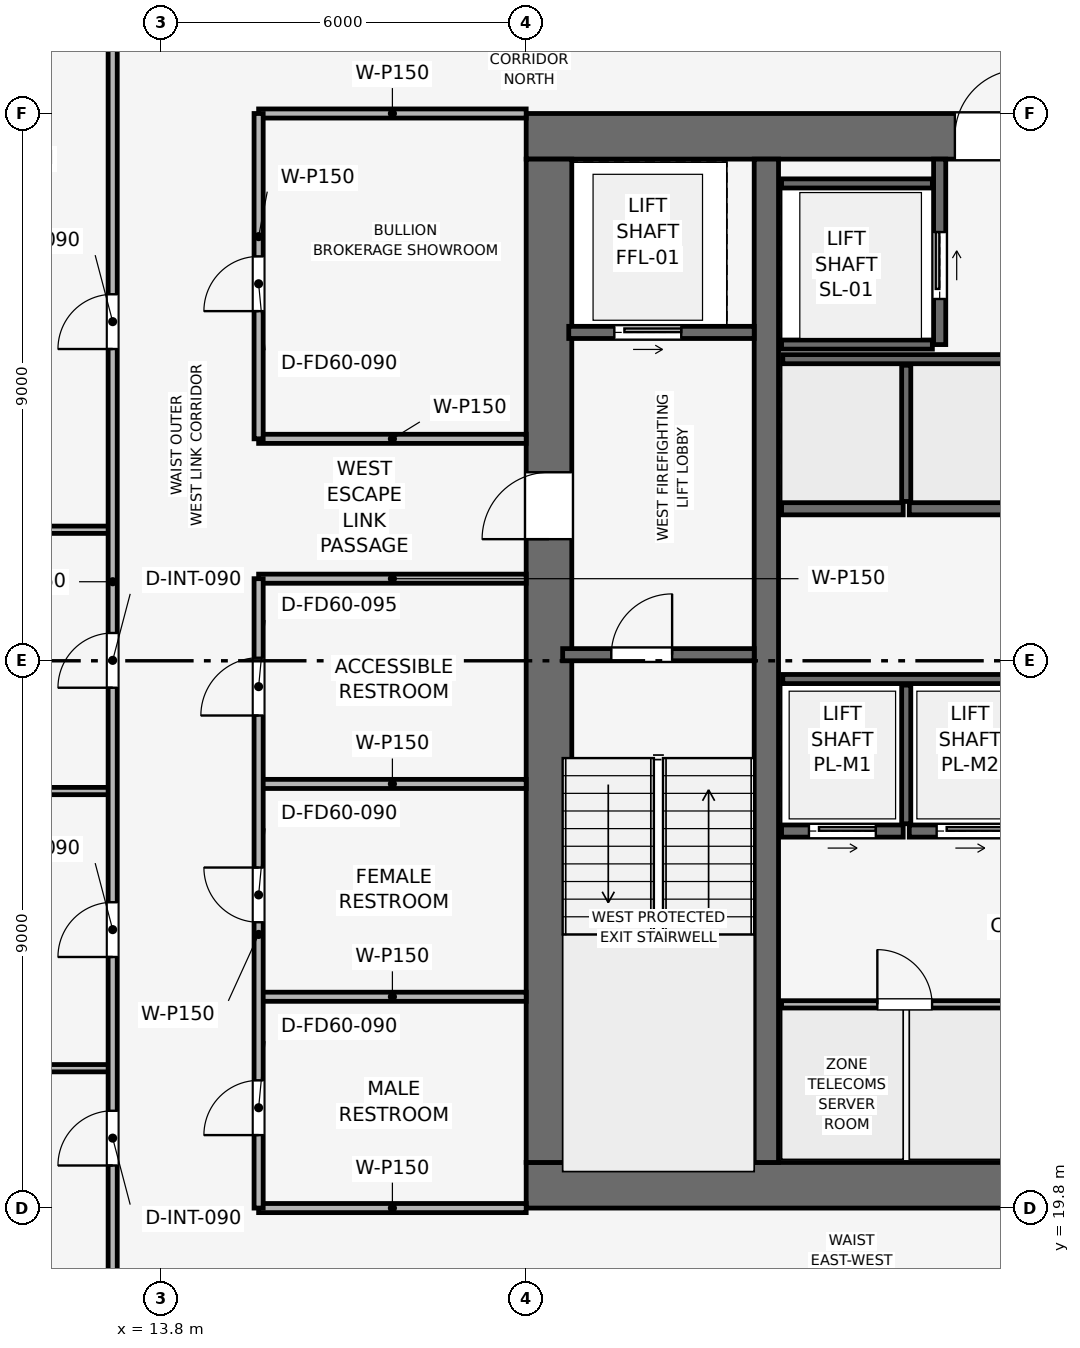
"""IFC4 building model, lengths in metres.
Left out: names, types, materials, properties, quantities, classifications, styles, units other than length and angle.
Written with IfcOpenShell. Run it as: python <this file> out.ifc"""

import sys

from ifc_helpers import new_model, si_unit, direction, frame, frame_2d, origin, place, context, subcontext, project, spatial, rectangle, extrude, element, fill, save


model = new_model("IFC4")
c1 = context("Model", 3, precision=1e-05, world=origin(), true_north=direction((0.0, 1.0)))
c2 = subcontext(c1, "Body", "Model", "MODEL_VIEW")
j1 = project(units=[si_unit("LENGTHUNIT", "METRE"), si_unit("PLANEANGLEUNIT", "RADIAN")], contexts=[c1])
p1 = place(None, origin())
s1 = spatial("IfcSite", under=j1, at=p1, CompositionType="ELEMENT")
p2 = place(p1, origin())
s2 = spatial("IfcBuilding", under=s1, at=p2, CompositionType="ELEMENT")
p3 = place(p2, frame((0.0, 0.0, 214.95)))
s3 = spatial("IfcBuildingStorey", under=s2, at=p3, CompositionType="ELEMENT", Elevation=214.95)
p4 = place(p3, frame((19.8, 20.175, 0.0), z_axis=(0.0, 0.0, 1.0), x_axis=(1.0, 0.0, 0.0)))
e1 = element("IfcWall", 1, at=p4, inside=s3, PredefinedType="SHEAR", context=c2, shape_type="SweptSolid", body=[
    extrude(rectangle(XDim=18.0, YDim=0.75, at=frame_2d((9.0, 0.0))), origin(), (0.0, 0.0, 1.0), 3.75),
])
p5 = place(p4, frame((8.4, 0.0, 0.0)))
e2 = element("IfcOpeningElement", 2, at=p5, cuts=e1, PredefinedType="OPENING", context=c2, shape_type="SweptSolid", body=[
    extrude(rectangle(XDim=1.2, YDim=2.2, at=frame_2d((0.6, 1.1))), frame((0.0, 0.385, 0.0), z_axis=(0.0, -1.0, 0.0), x_axis=(1.0, 0.0, 0.0)), (0.0, 0.0, 1.0), 0.77),
])
p6 = place(p3, frame((19.8, 37.425, 0.0), z_axis=(0.0, 0.0, 1.0), x_axis=(1.0, 0.0, 0.0)))
e3 = element("IfcWall", 3, at=p6, inside=s3, PredefinedType="SHEAR", context=c2, shape_type="SweptSolid", body=[
    extrude(rectangle(XDim=18.0, YDim=0.75, at=frame_2d((9.0, 0.0))), origin(), (0.0, 0.0, 1.0), 3.75),
])
p7 = place(p6, frame((7.05, 0.0, 0.0)))
e4 = element("IfcOpeningElement", 4, at=p7, cuts=e3, PredefinedType="OPENING", context=c2, shape_type="SweptSolid", body=[
    extrude(rectangle(XDim=1.1, YDim=2.15, at=frame_2d((0.55, 1.075))), frame((0.0, 0.385, 0.0), z_axis=(0.0, -1.0, 0.0), x_axis=(1.0, 0.0, 0.0)), (0.0, 0.0, 1.0), 0.77),
])
p8 = place(p3, frame((20.175, 20.55, 0.0), z_axis=(0.0, 0.0, 1.0), x_axis=(0.0, 1.0, 0.0)))
e5 = element("IfcWall", 5, at=p8, inside=s3, PredefinedType="SHEAR", context=c2, shape_type="SweptSolid", body=[
    extrude(rectangle(XDim=16.5, YDim=0.75, at=frame_2d((8.25, 0.0))), origin(), (0.0, 0.0, 1.0), 3.75),
])
p9 = place(p8, frame((10.25, 0.0, 0.0)))
e6 = element("IfcOpeningElement", 6, at=p9, cuts=e5, PredefinedType="OPENING", context=c2, shape_type="SweptSolid", body=[
    extrude(rectangle(XDim=1.1, YDim=2.15, at=frame_2d((0.55, 1.075))), frame((0.0, 0.385, 0.0), z_axis=(0.0, -1.0, 0.0), x_axis=(1.0, 0.0, 0.0)), (0.0, 0.0, 1.0), 0.77),
])
p10 = place(p3, frame((23.75, 20.55, 0.0), z_axis=(0.0, 0.0, 1.0), x_axis=(0.0, 1.0, 0.0)))
e7 = element("IfcWall", 7, at=p10, inside=s3, PredefinedType="SHEAR", context=c2, shape_type="SweptSolid", body=[
    extrude(rectangle(XDim=16.5, YDim=0.4, at=frame_2d((8.25, 0.0))), origin(), (0.0, 0.0, 1.0), 3.75),
])
p11 = place(p3, frame((20.4, 28.9, 0.0), z_axis=(0.0, 0.0, 1.0), x_axis=(1.0, 0.0, 0.0)))
e8 = element("IfcWall", 8, at=p11, inside=s3, PredefinedType="SHEAR", context=c2, shape_type="SweptSolid", body=[
    extrude(rectangle(XDim=3.15, YDim=0.2, at=frame_2d((1.575, 0.0))), origin(), (0.0, 0.0, 1.0), 3.5),
])
p12 = place(p11, frame((0.8, 0.0, 0.0)))
e9 = element("IfcOpeningElement", 9, at=p12, cuts=e8, PredefinedType="OPENING", context=c2, shape_type="SweptSolid", body=[
    extrude(rectangle(XDim=1.0, YDim=2.1, at=frame_2d((0.5, 1.05))), frame((0.0, 0.11, 0.0), z_axis=(0.0, -1.0, 0.0), x_axis=(1.0, 0.0, 0.0)), (0.0, 0.0, 1.0), 0.22),
])
p13 = place(p3, frame((20.5, 34.2, 0.0), z_axis=(0.0, 0.0, 1.0), x_axis=(1.0, 0.0, 0.0)))
e10 = element("IfcWall", 10, at=p13, inside=s3, PredefinedType="SHEAR", context=c2, shape_type="SweptSolid", body=[
    extrude(rectangle(XDim=3.05, YDim=0.2, at=frame_2d((1.525, 0.0))), origin(), (0.0, 0.0, 1.0), 3.5),
])
p14 = place(p13, frame((0.75, 0.0, 0.0)))
e11 = element("IfcOpeningElement", 11, at=p14, cuts=e10, PredefinedType="OPENING", context=c2, shape_type="SweptSolid", body=[
    extrude(rectangle(XDim=1.1, YDim=2.15, at=frame_2d((0.55, 1.075))), frame((0.0, 0.11, 0.0), z_axis=(0.0, -1.0, 0.0), x_axis=(1.0, 0.0, 0.0)), (0.0, 0.0, 1.0), 0.22),
])
p15 = place(p3, frame((26.6, 34.0, 0.0), z_axis=(0.0, 0.0, 1.0), x_axis=(0.0, 1.0, 0.0)))
e12 = element("IfcWall", 12, at=p15, inside=s3, PredefinedType="SHEAR", context=c2, shape_type="SweptSolid", body=[
    extrude(rectangle(XDim=3.05, YDim=0.2, at=frame_2d((1.525, 0.0))), origin(), (0.0, 0.0, 1.0), 3.5),
])
p16 = place(p15, frame((0.75, 0.0, 0.0)))
e13 = element("IfcOpeningElement", 13, at=p16, cuts=e12, PredefinedType="OPENING", context=c2, shape_type="SweptSolid", body=[
    extrude(rectangle(XDim=1.1, YDim=2.15, at=frame_2d((0.55, 1.075))), frame((0.0, 0.11, 0.0), z_axis=(0.0, -1.0, 0.0), x_axis=(1.0, 0.0, 0.0)), (0.0, 0.0, 1.0), 0.22),
])
for number, where, z_axis, x_axis in (
    (14, (24.0, 34.0, 0.0), (0.0, 0.0, 1.0), (1.0, 0.0, 0.0)),
    (15, (24.0, 36.65, 0.0), (0.0, 0.0, 1.0), (1.0, 0.0, 0.0)),
):
    element("IfcWall", number, at=place(p3, frame(where, z_axis=z_axis, x_axis=x_axis)), inside=s3, PredefinedType="SHEAR", context=c2, shape_type="SweptSolid", body=[
        extrude(rectangle(XDim=2.48, YDim=0.15, at=frame_2d((1.24, 0.0))), origin(), (0.0, 0.0, 1.0), 3.5),
    ])
p17 = place(p3, frame((24.0, 26.0, 0.0), z_axis=(0.0, 0.0, 1.0), x_axis=(1.0, 0.0, 0.0)))
e16 = element("IfcWall", 16, at=p17, inside=s3, PredefinedType="SHEAR", context=c2, shape_type="SweptSolid", body=[
    extrude(rectangle(XDim=2.0, YDim=0.2, at=frame_2d((1.0, 0.0))), origin(), (0.0, 0.0, 1.0), 3.5),
])
p18 = place(p17, frame((0.45, 0.0, 0.0)))
e17 = element("IfcOpeningElement", 17, at=p18, cuts=e16, PredefinedType="OPENING", context=c2, shape_type="SweptSolid", body=[
    extrude(rectangle(XDim=1.1, YDim=2.15, at=frame_2d((0.55, 1.075))), frame((0.0, 0.11, 0.0), z_axis=(0.0, -1.0, 0.0), x_axis=(1.0, 0.0, 0.0)), (0.0, 0.0, 1.0), 0.22),
])
p19 = place(p3, frame((26.1, 26.0, 0.0), z_axis=(0.0, 0.0, 1.0), x_axis=(1.0, 0.0, 0.0)))
e18 = element("IfcWall", 18, at=p19, inside=s3, PredefinedType="SHEAR", context=c2, shape_type="SweptSolid", body=[
    extrude(rectangle(XDim=2.0, YDim=0.2, at=frame_2d((1.0, 0.0))), origin(), (0.0, 0.0, 1.0), 3.5),
])
p20 = place(p19, frame((0.45, 0.0, 0.0)))
e19 = element("IfcOpeningElement", 19, at=p20, cuts=e18, PredefinedType="OPENING", context=c2, shape_type="SweptSolid", body=[
    extrude(rectangle(XDim=1.1, YDim=2.15, at=frame_2d((0.55, 1.075))), frame((0.0, 0.11, 0.0), z_axis=(0.0, -1.0, 0.0), x_axis=(1.0, 0.0, 0.0)), (0.0, 0.0, 1.0), 0.22),
])
for number, where, z_axis, x_axis in (
    (20, (24.0, 31.3, 0.0), (0.0, 0.0, 1.0), (1.0, 0.0, 0.0)),
    (21, (26.1, 31.3, 0.0), (0.0, 0.0, 1.0), (1.0, 0.0, 0.0)),
):
    element("IfcWall", number, at=place(p3, frame(where, z_axis=z_axis, x_axis=x_axis)), inside=s3, PredefinedType="SHEAR", context=c2, shape_type="SweptSolid", body=[
        extrude(rectangle(XDim=2.0, YDim=0.2, at=frame_2d((1.0, 0.0))), origin(), (0.0, 0.0, 1.0), 3.5),
    ])
p21 = place(p3, frame((24.02, 28.5, 0.0), z_axis=(0.0, 0.0, 1.0), x_axis=(1.0, 0.0, 0.0)))
e22 = element("IfcWall", 22, at=p21, inside=s3, PredefinedType="SHEAR", context=c2, shape_type="SweptSolid", body=[
    extrude(rectangle(XDim=4.08, YDim=0.15, at=frame_2d((2.04, 0.0))), origin(), (0.0, 0.0, 1.0), 3.5),
])
p22 = place(p3, frame((26.05, 26.12, 0.0), z_axis=(0.0, 0.0, 1.0), x_axis=(0.0, 1.0, 0.0)))
e23 = element("IfcWall", 23, at=p22, inside=s3, PredefinedType="SHEAR", context=c2, shape_type="SweptSolid", body=[
    extrude(rectangle(XDim=2.28, YDim=0.15, at=frame_2d((1.14, 0.0))), origin(), (0.0, 0.0, 1.0), 3.5),
])
p23 = place(p3, frame((24.02, 33.76, 0.0), z_axis=(0.0, 0.0, 1.0), x_axis=(1.0, 0.0, 0.0)))
e24 = element("IfcWall", 24, at=p23, inside=s3, PredefinedType="SHEAR", context=c2, shape_type="SweptSolid", body=[
    extrude(rectangle(XDim=4.08, YDim=0.15, at=frame_2d((2.04, 0.0))), origin(), (0.0, 0.0, 1.0), 3.5),
])
p24 = place(p3, frame((26.05, 31.42, 0.0), z_axis=(0.0, 0.0, 1.0), x_axis=(0.0, 1.0, 0.0)))
e25 = element("IfcWall", 25, at=p24, inside=s3, PredefinedType="SHEAR", context=c2, shape_type="SweptSolid", body=[
    extrude(rectangle(XDim=2.24, YDim=0.15, at=frame_2d((1.12, 0.0))), origin(), (0.0, 0.0, 1.0), 3.5),
])
p25 = place(p3, frame((24.0, 23.15, 0.0), z_axis=(0.0, 0.0, 1.0), x_axis=(1.0, 0.0, 0.0)))
e26 = element("IfcWall", 26, at=p25, inside=s3, PredefinedType="PARTITIONING", context=c2, shape_type="SweptSolid", body=[
    extrude(rectangle(XDim=4.05, YDim=0.12, at=frame_2d((2.025, 0.0))), origin(), (0.0, 0.0, 1.0), 3.5),
])
p26 = place(p25, frame((1.575, 0.0, 0.0)))
e27 = element("IfcOpeningElement", 27, at=p26, cuts=e26, PredefinedType="OPENING", context=c2, shape_type="SweptSolid", body=[
    extrude(rectangle(XDim=0.9, YDim=2.1, at=frame_2d((0.45, 1.05))), frame((0.0, 0.07, 0.0), z_axis=(0.0, -1.0, 0.0), x_axis=(1.0, 0.0, 0.0)), (0.0, 0.0, 1.0), 0.14),
])
p27 = place(p3, frame((15.4, 19.8, 0.0), z_axis=(0.0, 0.0, 1.0), x_axis=(1.0, 0.0, 0.0)))
e28 = element("IfcWall", 28, at=p27, inside=s3, PredefinedType="PARTITIONING", context=c2, shape_type="SweptSolid", body=[
    extrude(rectangle(XDim=4.4, YDim=0.15, at=frame_2d((2.2, 0.0))), origin(), (0.0, 0.0, 1.0), 3.035),
])
for number, where, z_axis, x_axis in (
    (29, (15.4, 23.275, 0.0), (0.0, 0.0, 1.0), (1.0, 0.0, 0.0)),
    (30, (15.4, 26.775, 0.0), (0.0, 0.0, 1.0), (1.0, 0.0, 0.0)),
    (31, (15.4, 30.15, 0.0), (0.0, 0.0, 1.0), (1.0, 0.0, 0.0)),
    (32, (15.4, 32.45, 0.0), (0.0, 0.0, 1.0), (1.0, 0.0, 0.0)),
):
    element("IfcWall", number, at=place(p3, frame(where, z_axis=z_axis, x_axis=x_axis)), inside=s3, PredefinedType="PARTITIONING", context=c2, shape_type="SweptSolid", body=[
        extrude(rectangle(XDim=4.4, YDim=0.15, at=frame_2d((2.2, 0.0))), origin(), (0.0, 0.0, 1.0), 3.5),
    ])
p28 = place(p3, frame((15.4, 37.8, 0.0), z_axis=(0.0, 0.0, 1.0), x_axis=(1.0, 0.0, 0.0)))
e33 = element("IfcWall", 33, at=p28, inside=s3, PredefinedType="PARTITIONING", context=c2, shape_type="SweptSolid", body=[
    extrude(rectangle(XDim=4.4, YDim=0.15, at=frame_2d((2.2, 0.0))), origin(), (0.0, 0.0, 1.0), 3.035),
])
p29 = place(p3, frame((15.4, 19.8, 0.0), z_axis=(0.0, 0.0, 1.0), x_axis=(0.0, 1.0, 0.0)))
e34 = element("IfcWall", 34, at=p29, inside=s3, PredefinedType="PARTITIONING", context=c2, shape_type="SweptSolid", body=[
    extrude(rectangle(XDim=10.35, YDim=0.15, at=frame_2d((5.175, 0.0))), origin(), (0.0, 0.0, 1.0), 3.035),
])
p30 = place(p29, frame((1.2, 0.0, 0.0)))
e35 = element("IfcOpeningElement", 35, at=p30, cuts=e34, PredefinedType="OPENING", context=c2, shape_type="SweptSolid", body=[
    extrude(rectangle(XDim=0.9, YDim=2.1, at=frame_2d((0.45, 1.05))), frame((0.0, 0.085, 0.0), z_axis=(0.0, -1.0, 0.0), x_axis=(1.0, 0.0, 0.0)), (0.0, 0.0, 1.0), 0.17),
])
p31 = place(p29, frame((4.7, 0.0, 0.0)))
e36 = element("IfcOpeningElement", 36, at=p31, cuts=e34, PredefinedType="OPENING", context=c2, shape_type="SweptSolid", body=[
    extrude(rectangle(XDim=0.9, YDim=2.1, at=frame_2d((0.45, 1.05))), frame((0.0, 0.085, 0.0), z_axis=(0.0, -1.0, 0.0), x_axis=(1.0, 0.0, 0.0)), (0.0, 0.0, 1.0), 0.17),
])
p32 = place(p29, frame((8.1, 0.0, 0.0)))
e37 = element("IfcOpeningElement", 37, at=p32, cuts=e34, PredefinedType="OPENING", context=c2, shape_type="SweptSolid", body=[
    extrude(rectangle(XDim=0.95, YDim=2.1, at=frame_2d((0.475, 1.05))), frame((0.0, 0.085, 0.0), z_axis=(0.0, -1.0, 0.0), x_axis=(1.0, 0.0, 0.0)), (0.0, 0.0, 1.0), 0.17),
])
p33 = place(p3, frame((15.4, 32.45, 0.0), z_axis=(0.0, 0.0, 1.0), x_axis=(0.0, 1.0, 0.0)))
e38 = element("IfcWall", 38, at=p33, inside=s3, PredefinedType="PARTITIONING", context=c2, shape_type="SweptSolid", body=[
    extrude(rectangle(XDim=5.35, YDim=0.15, at=frame_2d((2.675, 0.0))), origin(), (0.0, 0.0, 1.0), 3.035),
])
p34 = place(p33, frame((2.1, 0.0, 0.0)))
e39 = element("IfcOpeningElement", 39, at=p34, cuts=e38, PredefinedType="OPENING", context=c2, shape_type="SweptSolid", body=[
    extrude(rectangle(XDim=0.9, YDim=2.1, at=frame_2d((0.45, 1.05))), frame((0.0, 0.085, 0.0), z_axis=(0.0, -1.0, 0.0), x_axis=(1.0, 0.0, 0.0)), (0.0, 0.0, 1.0), 0.17),
])
for number, where, z_axis, x_axis in (
    (40, (1.93, 22.1, 0.0), (0.0, 0.0, 1.0), (1.0, 0.0, 0.0)),
    (41, (1.93, 26.658, 0.0), (0.0, 0.0, 1.0), (1.0, 0.0, 0.0)),
    (42, (1.93, 30.955, 0.0), (0.0, 0.0, 1.0), (1.0, 0.0, 0.0)),
):
    element("IfcWall", number, at=place(p3, frame(where, z_axis=z_axis, x_axis=x_axis)), inside=s3, PredefinedType="PARTITIONING", context=c2, shape_type="SweptSolid", body=[
        extrude(rectangle(XDim=11.07, YDim=0.12, at=frame_2d((5.535, 0.0))), origin(), (0.0, 0.0, 1.0), 2.885),
    ])
p35 = place(p3, frame((13.0, 17.4, 0.0), z_axis=(0.0, 0.0, 1.0), x_axis=(0.0, 1.0, 0.0)))
e43 = element("IfcWall", 43, at=p35, inside=s3, PredefinedType="PARTITIONING", context=c2, shape_type="SweptSolid", body=[
    extrude(rectangle(XDim=22.8, YDim=0.15, at=frame_2d((11.4, 0.0))), origin(), (0.0, 0.0, 1.0), 3.035),
])
p36 = place(p35, frame((3.1, 0.0, 0.0)))
e44 = element("IfcOpeningElement", 44, at=p36, cuts=e43, PredefinedType="OPENING", context=c2, shape_type="SweptSolid", body=[
    extrude(rectangle(XDim=0.9, YDim=2.1, at=frame_2d((0.45, 1.05))), frame((0.0, 0.085, 0.0), z_axis=(0.0, -1.0, 0.0), x_axis=(1.0, 0.0, 0.0)), (0.0, 0.0, 1.0), 0.17),
])
p37 = place(p35, frame((6.529, 0.0, 0.0)))
e45 = element("IfcOpeningElement", 45, at=p37, cuts=e43, PredefinedType="OPENING", context=c2, shape_type="SweptSolid", body=[
    extrude(rectangle(XDim=0.9, YDim=2.1, at=frame_2d((0.45, 1.05))), frame((0.0, 0.085, 0.0), z_axis=(0.0, -1.0, 0.0), x_axis=(1.0, 0.0, 0.0)), (0.0, 0.0, 1.0), 0.17),
])
p38 = place(p35, frame((10.957, 0.0, 0.0)))
e46 = element("IfcOpeningElement", 46, at=p38, cuts=e43, PredefinedType="OPENING", context=c2, shape_type="SweptSolid", body=[
    extrude(rectangle(XDim=0.9, YDim=2.1, at=frame_2d((0.45, 1.05))), frame((0.0, 0.085, 0.0), z_axis=(0.0, -1.0, 0.0), x_axis=(1.0, 0.0, 0.0)), (0.0, 0.0, 1.0), 0.17),
])
p39 = place(p35, frame((16.527, 0.0, 0.0)))
e47 = element("IfcOpeningElement", 47, at=p39, cuts=e43, PredefinedType="OPENING", context=c2, shape_type="SweptSolid", body=[
    extrude(rectangle(XDim=0.9, YDim=2.1, at=frame_2d((0.45, 1.05))), frame((0.0, 0.085, 0.0), z_axis=(0.0, -1.0, 0.0), x_axis=(1.0, 0.0, 0.0)), (0.0, 0.0, 1.0), 0.17),
])
p40 = place(p12, origin())
e48 = element("IfcDoor", 48, at=p40, inside=s3, OperationType="SINGLE_SWING_RIGHT", PredefinedType="DOOR", context=c2, shape_type="SweptSolid", body=[
    extrude(rectangle(XDim=1.0, YDim=2.1, at=frame_2d((0.5, 1.05))), frame((0.0, 0.025, 0.0), z_axis=(0.0, -1.0, 0.0), x_axis=(1.0, 0.0, 0.0)), (0.0, 0.0, 1.0), 0.05),
])
fill(e9, e48)
p41 = place(p14, origin())
e49 = element("IfcDoor", 49, at=p41, inside=s3, OperationType="SLIDING_TO_RIGHT", PredefinedType="DOOR", context=c2, shape_type="SweptSolid", body=[
    extrude(rectangle(XDim=1.1, YDim=2.15, at=frame_2d((0.55, 1.075))), frame((0.0, 0.025, 0.0), z_axis=(0.0, -1.0, 0.0), x_axis=(1.0, 0.0, 0.0)), (0.0, 0.0, 1.0), 0.05),
])
fill(e11, e49)
p42 = place(p16, origin())
e50 = element("IfcDoor", 50, at=p42, inside=s3, OperationType="SLIDING_TO_RIGHT", PredefinedType="DOOR", context=c2, shape_type="SweptSolid", body=[
    extrude(rectangle(XDim=1.1, YDim=2.15, at=frame_2d((0.55, 1.075))), frame((0.0, 0.025, 0.0), z_axis=(0.0, -1.0, 0.0), x_axis=(1.0, 0.0, 0.0)), (0.0, 0.0, 1.0), 0.05),
])
fill(e13, e50)
p43 = place(p18, origin())
e51 = element("IfcDoor", 51, at=p43, inside=s3, OperationType="SLIDING_TO_RIGHT", PredefinedType="DOOR", context=c2, shape_type="SweptSolid", body=[
    extrude(rectangle(XDim=1.1, YDim=2.15, at=frame_2d((0.55, 1.075))), frame((0.0, 0.025, 0.0), z_axis=(0.0, -1.0, 0.0), x_axis=(1.0, 0.0, 0.0)), (0.0, 0.0, 1.0), 0.05),
])
fill(e17, e51)
p44 = place(p20, origin())
e52 = element("IfcDoor", 52, at=p44, inside=s3, OperationType="SLIDING_TO_RIGHT", PredefinedType="DOOR", context=c2, shape_type="SweptSolid", body=[
    extrude(rectangle(XDim=1.1, YDim=2.15, at=frame_2d((0.55, 1.075))), frame((0.0, 0.025, 0.0), z_axis=(0.0, -1.0, 0.0), x_axis=(1.0, 0.0, 0.0)), (0.0, 0.0, 1.0), 0.05),
])
fill(e19, e52)
p45 = place(p26, origin())
e53 = element("IfcDoor", 53, at=p45, inside=s3, OperationType="SINGLE_SWING_LEFT", PredefinedType="DOOR", context=c2, shape_type="SweptSolid", body=[
    extrude(rectangle(XDim=0.9, YDim=2.1, at=frame_2d((0.45, 1.05))), frame((0.0, 0.025, 0.0), z_axis=(0.0, -1.0, 0.0), x_axis=(1.0, 0.0, 0.0)), (0.0, 0.0, 1.0), 0.05),
])
fill(e27, e53)
p46 = place(p30, origin())
e54 = element("IfcDoor", 54, at=p46, inside=s3, OperationType="SINGLE_SWING_LEFT", PredefinedType="DOOR", context=c2, shape_type="SweptSolid", body=[
    extrude(rectangle(XDim=0.9, YDim=2.1, at=frame_2d((0.45, 1.05))), frame((0.0, 0.025, 0.0), z_axis=(0.0, -1.0, 0.0), x_axis=(1.0, 0.0, 0.0)), (0.0, 0.0, 1.0), 0.05),
])
fill(e35, e54)
p47 = place(p31, origin())
e55 = element("IfcDoor", 55, at=p47, inside=s3, OperationType="SINGLE_SWING_RIGHT", PredefinedType="DOOR", context=c2, shape_type="SweptSolid", body=[
    extrude(rectangle(XDim=0.9, YDim=2.1, at=frame_2d((0.45, 1.05))), frame((0.0, 0.025, 0.0), z_axis=(0.0, -1.0, 0.0), x_axis=(1.0, 0.0, 0.0)), (0.0, 0.0, 1.0), 0.05),
])
fill(e36, e55)
p48 = place(p32, origin())
e56 = element("IfcDoor", 56, at=p48, inside=s3, OperationType="SINGLE_SWING_LEFT", PredefinedType="DOOR", context=c2, shape_type="SweptSolid", body=[
    extrude(rectangle(XDim=0.95, YDim=2.1, at=frame_2d((0.475, 1.05))), frame((0.0, 0.025, 0.0), z_axis=(0.0, -1.0, 0.0), x_axis=(1.0, 0.0, 0.0)), (0.0, 0.0, 1.0), 0.05),
])
fill(e37, e56)
p49 = place(p34, origin())
e57 = element("IfcDoor", 57, at=p49, inside=s3, OperationType="SINGLE_SWING_LEFT", PredefinedType="DOOR", context=c2, shape_type="SweptSolid", body=[
    extrude(rectangle(XDim=0.9, YDim=2.1, at=frame_2d((0.45, 1.05))), frame((0.0, 0.025, 0.0), z_axis=(0.0, -1.0, 0.0), x_axis=(1.0, 0.0, 0.0)), (0.0, 0.0, 1.0), 0.05),
])
fill(e39, e57)
p50 = place(p36, origin())
e58 = element("IfcDoor", 58, at=p50, inside=s3, OperationType="SINGLE_SWING_LEFT", PredefinedType="DOOR", context=c2, shape_type="SweptSolid", body=[
    extrude(rectangle(XDim=0.9, YDim=2.1, at=frame_2d((0.45, 1.05))), frame((0.0, 0.025, 0.0), z_axis=(0.0, -1.0, 0.0), x_axis=(1.0, 0.0, 0.0)), (0.0, 0.0, 1.0), 0.05),
])
fill(e44, e58)
p51 = place(p37, origin())
e59 = element("IfcDoor", 59, at=p51, inside=s3, OperationType="SINGLE_SWING_LEFT", PredefinedType="DOOR", context=c2, shape_type="SweptSolid", body=[
    extrude(rectangle(XDim=0.9, YDim=2.1, at=frame_2d((0.45, 1.05))), frame((0.0, 0.025, 0.0), z_axis=(0.0, -1.0, 0.0), x_axis=(1.0, 0.0, 0.0)), (0.0, 0.0, 1.0), 0.05),
])
fill(e45, e59)
p52 = place(p38, origin())
e60 = element("IfcDoor", 60, at=p52, inside=s3, OperationType="SINGLE_SWING_LEFT", PredefinedType="DOOR", context=c2, shape_type="SweptSolid", body=[
    extrude(rectangle(XDim=0.9, YDim=2.1, at=frame_2d((0.45, 1.05))), frame((0.0, 0.025, 0.0), z_axis=(0.0, -1.0, 0.0), x_axis=(1.0, 0.0, 0.0)), (0.0, 0.0, 1.0), 0.05),
])
fill(e46, e60)
p53 = place(p39, origin())
e61 = element("IfcDoor", 61, at=p53, inside=s3, OperationType="SINGLE_SWING_LEFT", PredefinedType="DOOR", context=c2, shape_type="SweptSolid", body=[
    extrude(rectangle(XDim=0.9, YDim=2.1, at=frame_2d((0.45, 1.05))), frame((0.0, 0.025, 0.0), z_axis=(0.0, -1.0, 0.0), x_axis=(1.0, 0.0, 0.0)), (0.0, 0.0, 1.0), 0.05),
])
fill(e47, e61)
p54 = place(p9, origin())
e62 = element("IfcDoor", 62, at=p54, inside=s3, OperationType="SINGLE_SWING_LEFT", PredefinedType="DOOR", context=c2, shape_type="SweptSolid", body=[
    extrude(rectangle(XDim=1.1, YDim=2.15, at=frame_2d((0.55, 1.075))), frame((0.0, 0.025, 0.0), z_axis=(0.0, -1.0, 0.0), x_axis=(1.0, 0.0, 0.0)), (0.0, 0.0, 1.0), 0.05),
])
fill(e6, e62)
p55 = place(p7, origin())
e63 = element("IfcDoor", 63, at=p55, inside=s3, OperationType="SINGLE_SWING_RIGHT", PredefinedType="DOOR", context=c2, shape_type="SweptSolid", body=[
    extrude(rectangle(XDim=1.1, YDim=2.15, at=frame_2d((0.55, 1.075))), frame((0.0, 0.025, 0.0), z_axis=(0.0, -1.0, 0.0), x_axis=(1.0, 0.0, 0.0)), (0.0, 0.0, 1.0), 0.05),
])
fill(e4, e63)
save(model, sys.argv[1])
